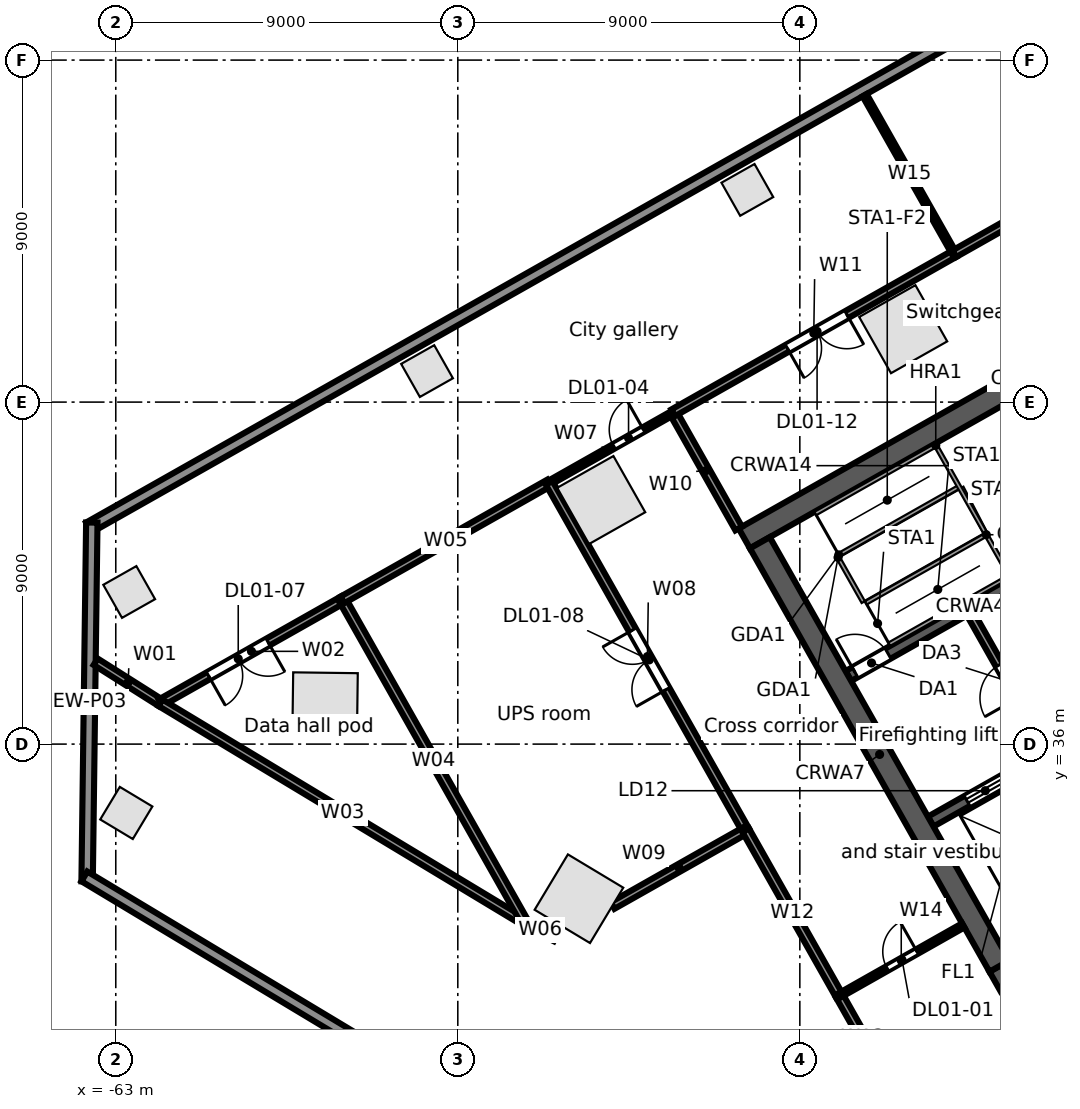
"""IFC4 building model, lengths in metres.
Left out: names, types, materials, properties, quantities, classifications, styles, units other than length and angle.
Written with IfcOpenShell. Run it as: python <this file> out.ifc"""

import sys

from ifc_helpers import new_model, si_unit, direction, frame, frame_2d, origin, origin_2d, place, context, subcontext, project, spatial, rectangle, extrude, element, fill, save


model = new_model("IFC4")
c1 = context("Model", 3, precision=1e-05, world=origin(), true_north=direction((0.0, 1.0)))
c2 = subcontext(c1, "Body", "Model", "MODEL_VIEW")
j1 = project(units=[si_unit("LENGTHUNIT", "METRE"), si_unit("PLANEANGLEUNIT", "RADIAN")], contexts=[c1])
p1 = place(None, origin())
s1 = spatial("IfcSite", under=j1, at=p1, CompositionType="ELEMENT")
p2 = place(p1, origin())
s2 = spatial("IfcBuilding", under=s1, at=p2, CompositionType="ELEMENT")
p3 = place(p2, frame((0.0, 0.0, 6.5)))
s3 = spatial("IfcBuildingStorey", under=s2, at=p3, CompositionType="ELEMENT", Elevation=6.5)
for number, where, z_axis, x_axis in (
    (1, (-42.28, 46.919, 0.0), (0.0, 0.0, 1.0), (-0.87, -0.492, 0.0)),
    (2, (-50.226, 42.423, 0.0), (0.0, 0.0, 1.0), (-0.87, -0.492, 0.0)),
    (3, (-57.493, 37.027, 0.0), (0.0, 0.0, 1.0), (-0.013, -1.0, 0.0)),
    (4, (-50.812, 31.931, 0.0), (0.0, 0.0, 1.0), (0.857, -0.515, 0.0)),
):
    element("IfcColumn", number, at=place(p3, frame(where, z_axis=z_axis, x_axis=x_axis)), inside=s3, PredefinedType="COLUMN", context=c2, shape_type="SweptSolid", body=[
        extrude(rectangle(XDim=1.7, YDim=1.7, at=origin_2d()), origin(), (0.0, 0.0, 1.0), 5.0),
    ])
for number, where, z_axis, x_axis in (
    (5, (-46.381, 50.584, 0.0), (0.0, 0.0, 1.0), (-0.87, -0.492, 0.0)),
    (6, (-54.81, 45.816, 0.0), (0.0, 0.0, 1.0), (-0.87, -0.492, 0.0)),
    (7, (-62.647, 40.003, 0.0), (0.0, 0.0, 1.0), (-0.87, -0.492, 0.0)),
    (8, (-62.723, 34.188, 0.0), (0.0, 0.0, 1.0), (0.857, -0.515, 0.0)),
):
    element("IfcColumn", number, at=place(p3, frame(where, z_axis=z_axis, x_axis=x_axis)), inside=s3, PredefinedType="COLUMN", context=c2, shape_type="SweptSolid", body=[
        extrude(rectangle(XDim=1.0, YDim=1.0, at=origin_2d()), origin(), (0.0, 0.0, 1.0), 5.0),
    ])
p4 = place(p3, frame((-63.707, 41.701, 0.0), z_axis=(0.0, 0.0, 1.0), x_axis=(0.870355510268, 0.492423888277, 0.0)))
e9 = element("IfcWall", 9, at=p4, inside=s3, PredefinedType="STANDARD", context=c2, shape_type="SweptSolid", body=[
    extrude(rectangle(XDim=67.903, YDim=0.3, at=frame_2d((33.952, 0.0))), origin(), (0.0, 0.0, 1.0), 4.65),
])
p5 = place(p3, frame((-63.754, 32.387, 0.0), z_axis=(0.0, 0.0, 1.0), x_axis=(0.013081929375, 0.999914427901, 0.0)))
e10 = element("IfcWall", 10, at=p5, inside=s3, PredefinedType="STANDARD", context=c2, shape_type="SweptSolid", body=[
    extrude(rectangle(XDim=9.443, YDim=0.3, at=frame_2d((4.722, 0.0))), origin(), (0.0, 0.0, 1.0), 4.65),
])
p6 = place(p3, frame((-45.526, 21.522, 0.0), z_axis=(0.0, 0.0, 1.0), x_axis=(-0.857164837164, 0.515042174903, 0.0)))
e11 = element("IfcWall", 11, at=p6, inside=s3, PredefinedType="STANDARD", context=c2, shape_type="SweptSolid", body=[
    extrude(rectangle(XDim=21.35, YDim=0.3, at=frame_2d((10.675, 0.0))), origin(), (0.0, 0.0, 1.0), 4.65),
])
p7 = place(p3, frame((-39.862, 29.749, 0.0), z_axis=(0.0, 0.0, 1.0), x_axis=(0.870350116061, 0.492433422375, 0.0)))
e12 = element("IfcWall", 12, at=p7, inside=s3, PredefinedType="SOLIDWALL", context=c2, shape_type="SweptSolid", body=[
    extrude(rectangle(XDim=17.0, YDim=0.6, at=frame_2d((8.5, 0.0))), origin(), (0.0, 0.0, 1.0), 4.65),
])
p8 = place(p7, frame((7.2, 0.0, 0.0)))
e13 = element("IfcOpeningElement", 13, at=p8, cuts=e12, PredefinedType="OPENING", context=c2, shape_type="SweptSolid", body=[
    extrude(rectangle(XDim=1.2, YDim=2.1, at=frame_2d((0.6, 1.05))), frame((0.0, 0.31, 0.0), z_axis=(0.0, -1.0, 0.0), x_axis=(1.0, 0.0, 0.0)), (0.0, 0.0, 1.0), 0.62),
])
p9 = place(p3, frame((-41.556, 33.961, 0.0), z_axis=(0.0, 0.0, 1.0), x_axis=(0.870343731308, 0.492444706919, 0.0)))
e14 = element("IfcWall", 14, at=p9, inside=s3, PredefinedType="SOLIDWALL", context=c2, shape_type="SweptSolid", body=[
    extrude(rectangle(XDim=6.0, YDim=0.3, at=frame_2d((3.0, 0.0))), origin(), (0.0, 0.0, 1.0), 4.65),
])
p10 = place(p9, frame((1.1, 0.0, 0.0)))
e15 = element("IfcOpeningElement", 15, at=p10, cuts=e14, PredefinedType="OPENING", context=c2, shape_type="SweptSolid", body=[
    extrude(rectangle(XDim=1.1, YDim=2.1, at=frame_2d((0.55, 1.05))), frame((0.0, 0.16, 0.0), z_axis=(0.0, -1.0, 0.0), x_axis=(1.0, 0.0, 0.0)), (0.0, 0.0, 1.0), 0.32),
])
p11 = place(p9, frame((4.25, 0.0, 0.0)))
e16 = element("IfcOpeningElement", 16, at=p11, cuts=e14, PredefinedType="OPENING", context=c2, shape_type="SweptSolid", body=[
    extrude(rectangle(XDim=1.1, YDim=2.1, at=frame_2d((0.55, 1.05))), frame((0.0, 0.16, 0.0), z_axis=(0.0, -1.0, 0.0), x_axis=(1.0, 0.0, 0.0)), (0.0, 0.0, 1.0), 0.32),
])
p12 = place(p3, frame((-43.723, 37.791, 0.0), z_axis=(0.0, 0.0, 1.0), x_axis=(0.87035077051, 0.49243226567, 0.0)))
e17 = element("IfcWall", 17, at=p12, inside=s3, PredefinedType="SOLIDWALL", context=c2, shape_type="SweptSolid", body=[
    extrude(rectangle(XDim=7.4, YDim=0.3, at=frame_2d((3.7, 0.0))), origin(), (0.0, 0.0, 1.0), 4.65),
])
p13 = place(p12, frame((0.2, 0.0, 0.0)))
e18 = element("IfcOpeningElement", 18, at=p13, cuts=e17, PredefinedType="OPENING", context=c2, shape_type="SweptSolid", body=[
    extrude(rectangle(XDim=1.0, YDim=2.1, at=frame_2d((0.5, 1.05))), frame((0.0, 0.16, 0.0), z_axis=(0.0, -1.0, 0.0), x_axis=(1.0, 0.0, 0.0)), (0.0, 0.0, 1.0), 0.32),
])
p14 = place(p3, frame((-46.461, 41.412, 0.0), z_axis=(0.0, 0.0, 1.0), x_axis=(0.870350116061, 0.492433422375, 0.0)))
e19 = element("IfcWall", 19, at=p14, inside=s3, PredefinedType="SOLIDWALL", context=c2, shape_type="SweptSolid", body=[
    extrude(rectangle(XDim=17.0, YDim=0.6, at=frame_2d((8.5, 0.0))), origin(), (0.0, 0.0, 1.0), 4.65),
])
p15 = place(p3, frame((-46.052, 41.298, 0.0), z_axis=(0.0, 0.0, 1.0), x_axis=(0.492418598281, -0.870358503186, 0.0)))
e20 = element("IfcWall", 20, at=p15, inside=s3, PredefinedType="SOLIDWALL", context=c2, shape_type="SweptSolid", body=[
    extrude(rectangle(XDim=12.8, YDim=0.6, at=frame_2d((6.4, 0.0))), origin(), (0.0, 0.0, 1.0), 4.65),
])
p16 = place(p3, frame((-40.516, 39.433, 0.0), z_axis=(0.0, 0.0, 1.0), x_axis=(0.492453559952, -0.87033872216, 0.0)))
e21 = element("IfcWall", 21, at=p16, inside=s3, PredefinedType="PARTITIONING", context=c2, shape_type="SweptSolid", body=[
    extrude(rectangle(XDim=4.1, YDim=0.2, at=frame_2d((2.05, 0.0))), origin(), (0.0, 0.0, 1.0), 4.65),
])
p17 = place(p16, frame((1.55, 0.0, 0.0)))
e22 = element("IfcOpeningElement", 22, at=p17, cuts=e21, PredefinedType="OPENING", context=c2, shape_type="SweptSolid", body=[
    extrude(rectangle(XDim=1.0, YDim=2.1, at=frame_2d((0.5, 1.05))), frame((0.0, 0.11, 0.0), z_axis=(0.0, -1.0, 0.0), x_axis=(1.0, 0.0, 0.0)), (0.0, 0.0, 1.0), 0.22),
])
p18 = place(p3, frame((-63.529, 38.167, 0.0), z_axis=(0.0, 0.0, 1.0), x_axis=(0.844913795328, -0.534902494352, 0.0)))
e23 = element("IfcWall", 23, at=p18, inside=s3, PredefinedType="PARTITIONING", context=c2, shape_type="SweptSolid", body=[
    extrude(rectangle(XDim=2.019, YDim=0.2, at=frame_2d((1.01, 0.0))), origin(), (0.0, 0.0, 1.0), 4.13),
])
p19 = place(p3, frame((-61.823, 37.087, 0.0), z_axis=(0.0, 0.0, 1.0), x_axis=(0.870387515286, 0.492367315359, 0.0)))
e24 = element("IfcWall", 24, at=p19, inside=s3, PredefinedType="PARTITIONING", context=c2, shape_type="SweptSolid", body=[
    extrude(rectangle(XDim=5.5, YDim=0.2, at=frame_2d((2.75, 0.0))), origin(), (0.0, 0.0, 1.0), 3.83),
])
p20 = place(p19, frame((1.45, 0.0, 0.0)))
e25 = element("IfcOpeningElement", 25, at=p20, cuts=e24, PredefinedType="OPENING", context=c2, shape_type="SweptSolid", body=[
    extrude(rectangle(XDim=1.8, YDim=2.1, at=frame_2d((0.9, 1.05))), frame((0.0, 0.11, 0.0), z_axis=(0.0, -1.0, 0.0), x_axis=(1.0, 0.0, 0.0)), (0.0, 0.0, 1.0), 0.22),
])
p21 = place(p3, frame((-61.823, 37.087, 0.0), z_axis=(0.0, 0.0, 1.0), x_axis=(0.85653126321, -0.516095141562, 0.0)))
e26 = element("IfcWall", 26, at=p21, inside=s3, PredefinedType="PARTITIONING", context=c2, shape_type="SweptSolid", body=[
    extrude(rectangle(XDim=11.195, YDim=0.2, at=frame_2d((5.598, 0.0))), origin(), (0.0, 0.0, 1.0), 3.822),
])
p22 = place(p3, frame((-57.036, 39.795, 0.0), z_axis=(0.0, 0.0, 1.0), x_axis=(0.492496959124, -0.870314164687, 0.0)))
e27 = element("IfcWall", 27, at=p22, inside=s3, PredefinedType="PARTITIONING", context=c2, shape_type="SweptSolid", body=[
    extrude(rectangle(XDim=9.75, YDim=0.2, at=frame_2d((4.875, 0.0))), origin(), (0.0, 0.0, 1.0), 3.822),
])
p23 = place(p3, frame((-57.036, 39.795, 0.0), z_axis=(0.0, 0.0, 1.0), x_axis=(0.870331405276, 0.492466491236, 0.0)))
e28 = element("IfcWall", 28, at=p23, inside=s3, PredefinedType="PARTITIONING", context=c2, shape_type="SweptSolid", body=[
    extrude(rectangle(XDim=6.25, YDim=0.2, at=frame_2d((3.125, 0.0))), origin(), (0.0, 0.0, 1.0), 3.83),
])
p24 = place(p3, frame((-52.234, 31.309, 0.0), z_axis=(0.0, 0.0, 1.0), x_axis=(0.89219447326, -0.451651438483, 0.0)))
e29 = element("IfcWall", 29, at=p24, inside=s3, PredefinedType="PARTITIONING", context=c2, shape_type="SweptSolid", body=[
    extrude(rectangle(XDim=0.901, YDim=0.2, at=frame_2d((0.451, 0.0))), origin(), (0.0, 0.0, 1.0), 3.712),
])
p25 = place(p3, frame((-51.596, 42.873, 0.0), z_axis=(0.0, 0.0, 1.0), x_axis=(0.87043427122, 0.492284652905, 0.0)))
e30 = element("IfcWall", 30, at=p25, inside=s3, PredefinedType="PARTITIONING", context=c2, shape_type="SweptSolid", body=[
    extrude(rectangle(XDim=3.75, YDim=0.125, at=frame_2d((1.875, 0.0))), origin(), (0.0, 0.0, 1.0), 4.65),
])
p26 = place(p25, frame((1.95, 0.0, 0.0)))
e31 = element("IfcOpeningElement", 31, at=p26, cuts=e30, PredefinedType="OPENING", context=c2, shape_type="SweptSolid", body=[
    extrude(rectangle(XDim=0.9, YDim=2.1, at=frame_2d((0.45, 1.05))), frame((0.0, 0.073, 0.0), z_axis=(0.0, -1.0, 0.0), x_axis=(1.0, 0.0, 0.0)), (0.0, 0.0, 1.0), 0.145),
])
p27 = place(p3, frame((-51.596, 42.873, 0.0), z_axis=(0.0, 0.0, 1.0), x_axis=(0.492438738815, -0.870347108064, 0.0)))
e32 = element("IfcWall", 32, at=p27, inside=s3, PredefinedType="PARTITIONING", context=c2, shape_type="SweptSolid", body=[
    extrude(rectangle(XDim=10.5, YDim=0.2, at=frame_2d((5.25, 0.0))), origin(), (0.0, 0.0, 1.0), 3.712),
])
p28 = place(p27, frame((4.45, 0.0, 0.0)))
e33 = element("IfcOpeningElement", 33, at=p28, cuts=e32, PredefinedType="OPENING", context=c2, shape_type="SweptSolid", body=[
    extrude(rectangle(XDim=1.8, YDim=2.1, at=frame_2d((0.9, 1.05))), frame((0.0, 0.11, 0.0), z_axis=(0.0, -1.0, 0.0), x_axis=(1.0, 0.0, 0.0)), (0.0, 0.0, 1.0), 0.22),
])
p29 = place(p3, frame((-49.928, 31.752, 0.0), z_axis=(0.0, 0.0, 1.0), x_axis=(0.870348099826, 0.492436985948, 0.0)))
e34 = element("IfcWall", 34, at=p29, inside=s3, PredefinedType="PARTITIONING", context=c2, shape_type="SweptSolid", body=[
    extrude(rectangle(XDim=4.025, YDim=0.2, at=frame_2d((2.012, 0.0))), origin(), (0.0, 0.0, 1.0), 4.65),
])
p30 = place(p3, frame((-48.332, 44.719, 0.0), z_axis=(0.0, 0.0, 1.0), x_axis=(0.492392845909, -0.87037307248, 0.0)))
e35 = element("IfcWall", 35, at=p30, inside=s3, PredefinedType="PARTITIONING", context=c2, shape_type="SweptSolid", body=[
    extrude(rectangle(XDim=3.5, YDim=0.2, at=frame_2d((1.75, 0.0))), origin(), (0.0, 0.0, 1.0), 3.93),
])
p31 = place(p3, frame((-48.332, 44.719, 0.0), z_axis=(0.0, 0.0, 1.0), x_axis=(0.870331650579, 0.492466057713, 0.0)))
e36 = element("IfcWall", 36, at=p31, inside=s3, PredefinedType="PARTITIONING", context=c2, shape_type="SweptSolid", body=[
    extrude(rectangle(XDim=8.5, YDim=0.2, at=frame_2d((4.25, 0.0))), origin(), (0.0, 0.0, 1.0), 4.03),
])
p32 = place(p31, frame((3.45, 0.0, 0.0)))
e37 = element("IfcOpeningElement", 37, at=p32, cuts=e36, PredefinedType="OPENING", context=c2, shape_type="SweptSolid", body=[
    extrude(rectangle(XDim=1.8, YDim=2.1, at=frame_2d((0.9, 1.05))), frame((0.0, 0.11, 0.0), z_axis=(0.0, -1.0, 0.0), x_axis=(1.0, 0.0, 0.0)), (0.0, 0.0, 1.0), 0.22),
])
p33 = place(p3, frame((-46.425, 33.734, 0.0), z_axis=(0.0, 0.0, 1.0), x_axis=(0.492427267353, -0.870353598469, 0.0)))
e38 = element("IfcWall", 38, at=p33, inside=s3, PredefinedType="PARTITIONING", context=c2, shape_type="SweptSolid", body=[
    extrude(rectangle(XDim=5.0, YDim=0.2, at=frame_2d((2.5, 0.0))), origin(), (0.0, 0.0, 1.0), 4.65),
])
p34 = place(p3, frame((-43.963, 29.382, 0.0), z_axis=(0.0, 0.0, 1.0), x_axis=(0.492408705769, -0.870364099951, 0.0)))
e39 = element("IfcWall", 39, at=p34, inside=s3, PredefinedType="PARTITIONING", context=c2, shape_type="SweptSolid", body=[
    extrude(rectangle(XDim=2.541, YDim=0.2, at=frame_2d((1.27, 0.0))), origin(), (0.0, 0.0, 1.0), 3.93),
])
p35 = place(p3, frame((-43.963, 29.382, 0.0), z_axis=(0.0, 0.0, 1.0), x_axis=(0.870259488443, 0.492593567533, 0.0)))
e40 = element("IfcWall", 40, at=p35, inside=s3, PredefinedType="PARTITIONING", context=c2, shape_type="SweptSolid", body=[
    extrude(rectangle(XDim=3.749, YDim=0.125, at=frame_2d((1.875, 0.0))), origin(), (0.0, 0.0, 1.0), 4.024),
])
p36 = place(p35, frame((1.45, 0.0, 0.0)))
e41 = element("IfcOpeningElement", 41, at=p36, cuts=e40, PredefinedType="OPENING", context=c2, shape_type="SweptSolid", body=[
    extrude(rectangle(XDim=0.9, YDim=2.1, at=frame_2d((0.45, 1.05))), frame((0.0, 0.073, 0.0), z_axis=(0.0, -1.0, 0.0), x_axis=(1.0, 0.0, 0.0)), (0.0, 0.0, 1.0), 0.145),
])
p37 = place(p3, frame((-43.295, 53.077, 0.0), z_axis=(0.0, 0.0, 1.0), x_axis=(0.492503605136, -0.87031040378, 0.0)))
e42 = element("IfcWall", 42, at=p37, inside=s3, PredefinedType="PARTITIONING", context=c2, shape_type="SweptSolid", body=[
    extrude(rectangle(XDim=4.793, YDim=0.125, at=frame_2d((2.397, 0.0))), origin(), (0.0, 0.0, 1.0), 3.93),
])
p38 = place(p3, frame((-40.934, 48.905, 0.0), z_axis=(0.0, 0.0, 1.0), x_axis=(0.870387854278, 0.492366716102, 0.0)))
e43 = element("IfcWall", 43, at=p38, inside=s3, PredefinedType="PARTITIONING", context=c2, shape_type="SweptSolid", body=[
    extrude(rectangle(XDim=8.5, YDim=0.2, at=frame_2d((4.25, 0.0))), origin(), (0.0, 0.0, 1.0), 4.03),
])
p39 = place(p10, origin())
e44 = element("IfcDoor", 44, at=p39, inside=s3, OperationType="DOUBLE_DOOR_SLIDING", PredefinedType="DOOR", context=c2, shape_type="SweptSolid", body=[
    extrude(rectangle(XDim=1.1, YDim=2.1, at=frame_2d((0.55, 1.05))), frame((0.0, 0.025, 0.0), z_axis=(0.0, -1.0, 0.0), x_axis=(1.0, 0.0, 0.0)), (0.0, 0.0, 1.0), 0.05),
])
fill(e15, e44)
p40 = place(p13, origin())
e45 = element("IfcDoor", 45, at=p40, inside=s3, OperationType="SINGLE_SWING_LEFT", PredefinedType="DOOR", context=c2, shape_type="SweptSolid", body=[
    extrude(rectangle(XDim=1.0, YDim=2.1, at=frame_2d((0.5, 1.05))), frame((0.0, 0.025, 0.0), z_axis=(0.0, -1.0, 0.0), x_axis=(1.0, 0.0, 0.0)), (0.0, 0.0, 1.0), 0.05),
])
fill(e18, e45)
p41 = place(p17, frame((1.0, 0.0, 0.0), z_axis=(0.0, 0.0, 1.0), x_axis=(-1.0, 0.0, 0.0)))
e46 = element("IfcDoor", 46, at=p41, inside=s3, OperationType="SINGLE_SWING_LEFT", PredefinedType="DOOR", context=c2, shape_type="SweptSolid", body=[
    extrude(rectangle(XDim=1.0, YDim=2.1, at=frame_2d((0.5, 1.05))), frame((0.0, 0.025, 0.0), z_axis=(0.0, -1.0, 0.0), x_axis=(1.0, 0.0, 0.0)), (0.0, 0.0, 1.0), 0.05),
])
fill(e22, e46)
p42 = place(p36, origin())
e47 = element("IfcDoor", 47, at=p42, inside=s3, OperationType="SINGLE_SWING_RIGHT", PredefinedType="DOOR", context=c2, shape_type="SweptSolid", body=[
    extrude(rectangle(XDim=0.9, YDim=2.1, at=frame_2d((0.45, 1.05))), frame((0.0, 0.025, 0.0), z_axis=(0.0, -1.0, 0.0), x_axis=(1.0, 0.0, 0.0)), (0.0, 0.0, 1.0), 0.05),
])
fill(e41, e47)
p43 = place(p26, origin())
e48 = element("IfcDoor", 48, at=p43, inside=s3, OperationType="SINGLE_SWING_RIGHT", PredefinedType="DOOR", context=c2, shape_type="SweptSolid", body=[
    extrude(rectangle(XDim=0.9, YDim=2.1, at=frame_2d((0.45, 1.05))), frame((0.0, 0.025, 0.0), z_axis=(0.0, -1.0, 0.0), x_axis=(1.0, 0.0, 0.0)), (0.0, 0.0, 1.0), 0.05),
])
fill(e31, e48)
p44 = place(p20, frame((1.8, 0.0, 0.0), z_axis=(0.0, 0.0, 1.0), x_axis=(-1.0, 0.0, 0.0)))
e49 = element("IfcDoor", 49, at=p44, inside=s3, OperationType="DOUBLE_DOOR_SINGLE_SWING", PredefinedType="DOOR", context=c2, shape_type="SweptSolid", body=[
    extrude(rectangle(XDim=1.8, YDim=2.1, at=frame_2d((0.9, 1.05))), frame((0.0, 0.025, 0.0), z_axis=(0.0, -1.0, 0.0), x_axis=(1.0, 0.0, 0.0)), (0.0, 0.0, 1.0), 0.05),
])
fill(e25, e49)
p45 = place(p28, frame((1.8, 0.0, 0.0), z_axis=(0.0, 0.0, 1.0), x_axis=(-1.0, 0.0, 0.0)))
e50 = element("IfcDoor", 50, at=p45, inside=s3, OperationType="DOUBLE_DOOR_SINGLE_SWING", PredefinedType="DOOR", context=c2, shape_type="SweptSolid", body=[
    extrude(rectangle(XDim=1.8, YDim=2.1, at=frame_2d((0.9, 1.05))), frame((0.0, 0.025, 0.0), z_axis=(0.0, -1.0, 0.0), x_axis=(1.0, 0.0, 0.0)), (0.0, 0.0, 1.0), 0.05),
])
fill(e33, e50)
p46 = place(p32, frame((1.8, 0.0, 0.0), z_axis=(0.0, 0.0, 1.0), x_axis=(-1.0, 0.0, 0.0)))
e51 = element("IfcDoor", 51, at=p46, inside=s3, OperationType="DOUBLE_DOOR_SINGLE_SWING", PredefinedType="DOOR", context=c2, shape_type="SweptSolid", body=[
    extrude(rectangle(XDim=1.8, YDim=2.1, at=frame_2d((0.9, 1.05))), frame((0.0, 0.025, 0.0), z_axis=(0.0, -1.0, 0.0), x_axis=(1.0, 0.0, 0.0)), (0.0, 0.0, 1.0), 0.05),
])
fill(e37, e51)
save(model, sys.argv[1])
